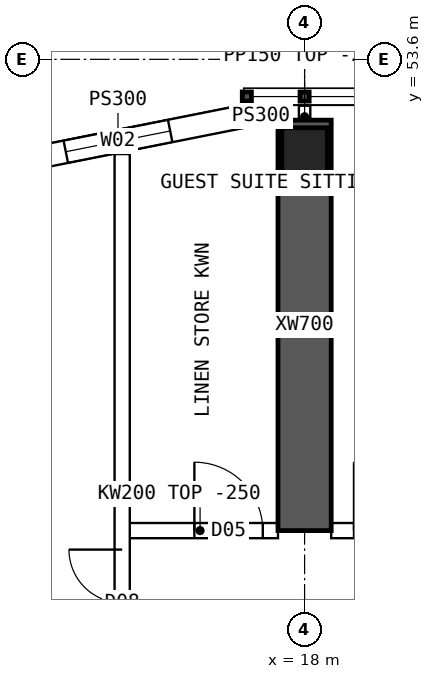
"""IFC4 building model, lengths in metres.
Left out: names, types, materials, properties, quantities, classifications, styles, units other than length and angle.
Written with IfcOpenShell. Run it as: python <this file> out.ifc"""

import sys

from ifc_helpers import new_model, si_unit, direction, frame, frame_2d, origin, origin_2d, place, context, subcontext, project, spatial, polyline, rectangle, hollow_rectangle, outline, extrude, element, fill, save


model = new_model("IFC4")
c1 = context("Model", 3, precision=1e-05, world=origin(), true_north=direction((0.0, 1.0)))
c2 = subcontext(c1, "Body", "Model", "MODEL_VIEW")
j1 = project(units=[si_unit("LENGTHUNIT", "METRE"), si_unit("PLANEANGLEUNIT", "RADIAN")], contexts=[c1])
p1 = place(None, origin())
s1 = spatial("IfcSite", under=j1, at=p1, CompositionType="ELEMENT")
p2 = place(p1, origin())
s2 = spatial("IfcBuilding", under=s1, at=p2, CompositionType="ELEMENT")
p3 = place(p2, frame((0.0, 0.0, 235.3)))
s3 = spatial("IfcBuildingStorey", under=s2, at=p3, CompositionType="ELEMENT", Elevation=235.3)
p4 = place(p3, frame((18.0, 52.4, 0.0), z_axis=(0.0, 0.0, 1.0), x_axis=(1.0, 0.0, 0.0)))
e1 = element("IfcColumn", 1, at=p4, inside=s3, PredefinedType="COLUMN", context=c2, shape_type="SweptSolid", body=[
    extrude(hollow_rectangle(XDim=0.6, YDim=0.6, WallThickness=0.06, at=origin_2d()), origin(), (0.0, 0.0, 1.0), 3.75),
])
p5 = place(p3, frame((18.0, 47.4, 0.0), z_axis=(0.0, 0.0, 1.0), x_axis=(0.0, 1.0, 0.0)))
e2 = element("IfcWall", 2, at=p5, inside=s3, PredefinedType="SHEAR", context=c2, shape_type="SweptSolid", body=[
    extrude(rectangle(XDim=5.4, YDim=0.7, at=frame_2d((2.7, 0.0))), origin(), (0.0, 0.0, 1.0), 3.75),
])
p6 = place(p3, frame((17.2, 52.85, 0.0), z_axis=(0.0, 0.0, 1.0), x_axis=(-0.98078325777, -0.195100490205, 0.0)))
e3 = element("IfcWall", 3, at=p6, inside=s3, PredefinedType="SOLIDWALL", context=c2, shape_type="SweptSolid", body=[
    extrude(outline(polyline([(-0.03, -0.15), (3.405, -0.15), (3.345, 0.15), (0.03, 0.15), (-0.03, -0.15)])), origin(), (0.0, 0.0, 1.0), 3.5),
])
p7 = place(p6, frame((0.988, 0.0, 0.9)))
e4 = element("IfcOpeningElement", 4, at=p7, cuts=e3, PredefinedType="OPENING", context=c2, shape_type="SweptSolid", body=[
    extrude(rectangle(XDim=1.4, YDim=1.8, at=frame_2d((0.7, 0.9))), frame((0.0, 0.16, 0.0), z_axis=(0.0, -1.0, 0.0), x_axis=(1.0, 0.0, 0.0)), (0.0, 0.0, 1.0), 0.32),
])
p8 = place(p3, frame((17.2, 52.85, 0.0), z_axis=(0.0, 0.0, 1.0), x_axis=(1.0, 0.0, 0.0)))
e5 = element("IfcWall", 5, at=p8, inside=s3, PredefinedType="SOLIDWALL", context=c2, shape_type="SweptSolid", body=[
    extrude(rectangle(XDim=0.45, YDim=0.3, at=frame_2d((0.225, 0.0))), origin(), (0.0, 0.0, 1.0), 3.5),
])
p9 = place(p3, frame((15.6, 47.4, 0.0), z_axis=(0.0, 0.0, 1.0), x_axis=(1.0, 0.0, 0.0)))
e6 = element("IfcWall", 6, at=p9, inside=s3, PredefinedType="SOLIDWALL", context=c2, shape_type="SweptSolid", body=[
    extrude(rectangle(XDim=2.05, YDim=0.2, at=frame_2d((1.025, 0.0))), origin(), (0.0, 0.0, 1.0), 3.5),
])
p10 = place(p9, frame((0.95, 0.0, 0.0)))
e7 = element("IfcOpeningElement", 7, at=p10, cuts=e6, PredefinedType="OPENING", context=c2, shape_type="SweptSolid", body=[
    extrude(rectangle(XDim=0.9, YDim=2.1, at=frame_2d((0.45, 1.05))), frame((0.0, 0.11, 0.0), z_axis=(0.0, -1.0, 0.0), x_axis=(1.0, 0.0, 0.0)), (0.0, 0.0, 1.0), 0.22),
])
p11 = place(p3, frame((18.35, 47.4, 0.0), z_axis=(0.0, 0.0, 1.0), x_axis=(1.0, 0.0, 0.0)))
e8 = element("IfcWall", 8, at=p11, inside=s3, PredefinedType="SOLIDWALL", context=c2, shape_type="SweptSolid", body=[
    extrude(outline(polyline([(0.0, 0.0), (5.3, 0.0), (5.3, 3.1), (0.0, 3.1), (0.0, 0.0)])), frame((0.0, 0.1, 0.0), z_axis=(0.0, -1.0, 0.0), x_axis=(1.0, 0.0, 0.0)), (0.0, 0.0, 1.0), 0.2),
])
p12 = place(p11, frame((0.3, 0.0, 0.0)))
e9 = element("IfcOpeningElement", 9, at=p12, cuts=e8, PredefinedType="OPENING", context=c2, shape_type="SweptSolid", body=[
    extrude(rectangle(XDim=0.9, YDim=2.1, at=frame_2d((0.45, 1.05))), frame((0.0, 0.11, 0.0), z_axis=(0.0, -1.0, 0.0), x_axis=(1.0, 0.0, 0.0)), (0.0, 0.0, 1.0), 0.22),
])
p13 = place(p3, frame((15.6, 11.646, 0.0), z_axis=(0.0, 0.0, 1.0), x_axis=(0.0, 1.0, 0.0)))
e10 = element("IfcWall", 10, at=p13, inside=s3, PredefinedType="SOLIDWALL", context=c2, shape_type="SweptSolid", body=[
    extrude(rectangle(XDim=40.708, YDim=0.2, at=frame_2d((20.354, 0.0))), origin(), (0.0, 0.0, 1.0), 3.5),
])
p14 = place(p13, frame((5.104, 0.0, 0.0)))
e11 = element("IfcOpeningElement", 11, at=p14, cuts=e10, PredefinedType="OPENING", context=c2, shape_type="SweptSolid", body=[
    extrude(rectangle(XDim=1.4, YDim=2.1, at=frame_2d((0.7, 1.05))), frame((0.0, 0.11, 0.0), z_axis=(0.0, -1.0, 0.0), x_axis=(1.0, 0.0, 0.0)), (0.0, 0.0, 1.0), 0.22),
])
p15 = place(p13, frame((34.104, 0.0, 0.0)))
e12 = element("IfcOpeningElement", 12, at=p15, cuts=e10, PredefinedType="OPENING", context=c2, shape_type="SweptSolid", body=[
    extrude(rectangle(XDim=1.4, YDim=2.1, at=frame_2d((0.7, 1.05))), frame((0.0, 0.11, 0.0), z_axis=(0.0, -1.0, 0.0), x_axis=(1.0, 0.0, 0.0)), (0.0, 0.0, 1.0), 0.22),
])
p16 = place(p3, frame((18.0, 52.7, 0.0), z_axis=(0.0, 0.0, 1.0), x_axis=(0.0, 1.0, 0.0)))
e13 = element("IfcWall", 13, at=p16, inside=s3, PredefinedType="PARTITIONING", context=c2, shape_type="SweptSolid", body=[
    extrude(rectangle(XDim=0.29, YDim=0.15, at=frame_2d((0.145, 0.0))), origin(), (0.0, 0.0, 1.0), 3.5),
])
p17 = place(p7, origin())
e14 = element("IfcWindow", 14, at=p17, inside=s3, PartitioningType="SINGLE_PANEL", PredefinedType="WINDOW", context=c2, shape_type="SweptSolid", body=[
    extrude(rectangle(XDim=1.4, YDim=1.8, at=frame_2d((0.7, 0.9))), frame((0.0, 0.03, 0.0), z_axis=(0.0, -1.0, 0.0), x_axis=(1.0, 0.0, 0.0)), (0.0, 0.0, 1.0), 0.06),
])
fill(e4, e14)
p18 = place(p15, origin())
e15 = element("IfcDoor", 15, at=p18, inside=s3, OperationType="DOUBLE_DOOR_SINGLE_SWING", PredefinedType="DOOR", context=c2, shape_type="SweptSolid", body=[
    extrude(rectangle(XDim=1.4, YDim=2.1, at=frame_2d((0.7, 1.05))), frame((0.0, 0.025, 0.0), z_axis=(0.0, -1.0, 0.0), x_axis=(1.0, 0.0, 0.0)), (0.0, 0.0, 1.0), 0.05),
])
fill(e12, e15)
p19 = place(p10, origin())
e16 = element("IfcDoor", 16, at=p19, inside=s3, OperationType="SINGLE_SWING_LEFT", PredefinedType="DOOR", context=c2, shape_type="SweptSolid", body=[
    extrude(rectangle(XDim=0.9, YDim=2.1, at=frame_2d((0.45, 1.05))), frame((0.0, 0.025, 0.0), z_axis=(0.0, -1.0, 0.0), x_axis=(1.0, 0.0, 0.0)), (0.0, 0.0, 1.0), 0.05),
])
fill(e7, e16)
save(model, sys.argv[1])
